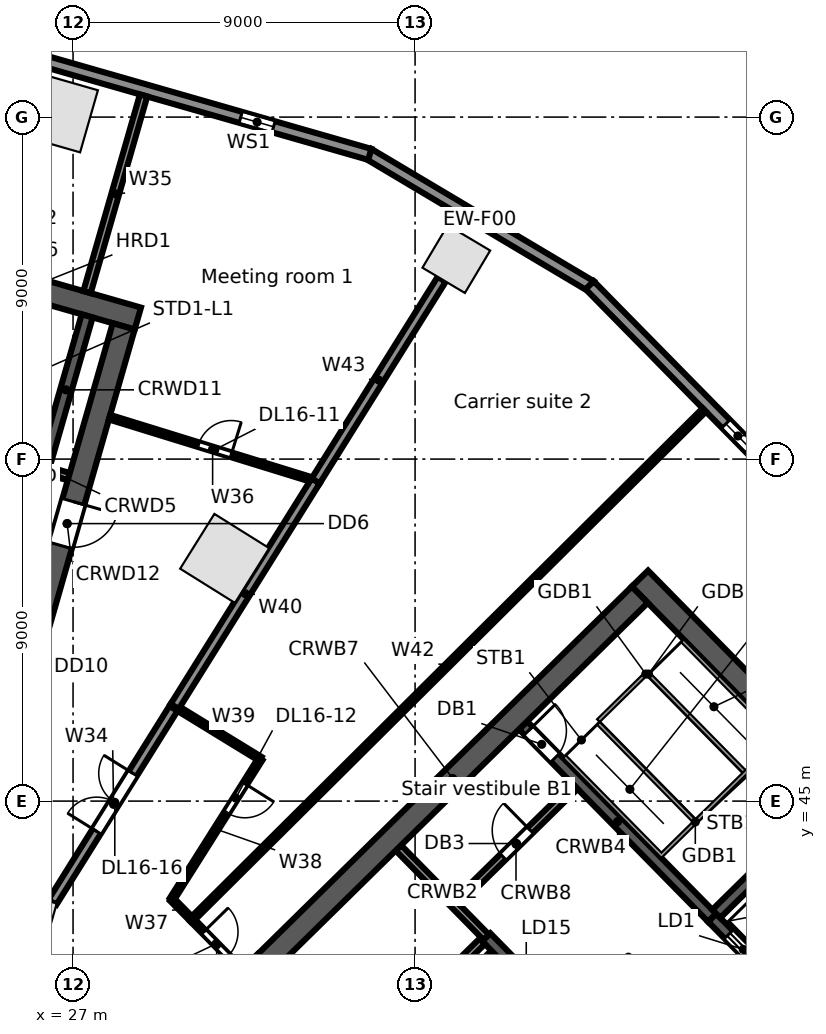
"""IFC4 building model, lengths in metres.
Left out: names, types, materials, properties, quantities, classifications, styles, units other than length and angle.
Written with IfcOpenShell. Run it as: python <this file> out.ifc"""

import sys

from ifc_helpers import new_model, si_unit, direction, frame, frame_2d, origin, origin_2d, place, context, subcontext, project, spatial, rectangle, extrude, element, fill, save


model = new_model("IFC4")
c1 = context("Model", 3, precision=1e-05, world=origin(), true_north=direction((0.0, 1.0)))
c2 = subcontext(c1, "Body", "Model", "MODEL_VIEW")
j1 = project(units=[si_unit("LENGTHUNIT", "METRE"), si_unit("PLANEANGLEUNIT", "RADIAN")], contexts=[c1])
p1 = place(None, origin())
s1 = spatial("IfcSite", under=j1, at=p1, CompositionType="ELEMENT")
p2 = place(p1, origin())
s2 = spatial("IfcBuilding", under=s1, at=p2, CompositionType="ELEMENT")
p3 = place(p2, frame((0.0, 0.0, 81.5)))
s3 = spatial("IfcBuildingStorey", under=s2, at=p3, CompositionType="ELEMENT", Elevation=81.5)
p4 = place(p3, frame((37.085, 59.262, 0.0), z_axis=(0.0, 0.0, 1.0), x_axis=(-0.859406411501, 0.511293086077, 0.0)))
e1 = element("IfcColumn", 1, at=p4, inside=s3, PredefinedType="COLUMN", context=c2, shape_type="SweptSolid", body=[
    extrude(rectangle(XDim=1.3, YDim=1.3, at=origin_2d()), origin(), (0.0, 0.0, 1.0), 5.0),
])
p5 = place(p3, frame((26.603, 63.124, 0.0), z_axis=(0.0, 0.0, 1.0), x_axis=(-0.961261695938, 0.275637355817, 0.0)))
e2 = element("IfcColumn", 2, at=p5, inside=s3, PredefinedType="COLUMN", context=c2, shape_type="SweptSolid", body=[
    extrude(rectangle(XDim=1.7, YDim=1.7, at=origin_2d()), origin(), (0.0, 0.0, 1.0), 5.0),
])
p6 = place(p3, frame((25.767, 41.86, 0.0), z_axis=(0.0, 0.0, 1.0), x_axis=(0.961261695938, -0.275637355817, 0.0)))
e3 = element("IfcColumn", 3, at=p6, inside=s3, PredefinedType="COLUMN", context=c2, shape_type="SweptSolid", body=[
    extrude(rectangle(XDim=1.3, YDim=1.3, at=origin_2d()), origin(), (0.0, 0.0, 1.0), 5.0),
])
p7 = place(p3, frame((30.99, 51.386, 0.0), z_axis=(0.0, 0.0, 1.0), x_axis=(0.529919264233, 0.848048096156, 0.0)))
e4 = element("IfcColumn", 4, at=p7, inside=s3, PredefinedType="COLUMN", context=c2, shape_type="SweptSolid", body=[
    extrude(rectangle(XDim=1.7, YDim=1.7, at=origin_2d()), origin(), (0.0, 0.0, 1.0), 5.0),
])
p8 = place(p3, frame((34.773, 62.034, 0.0), z_axis=(0.0, 0.0, 1.0), x_axis=(0.859401317772, -0.511301647769, 0.0)))
e5 = element("IfcWall", 5, at=p8, inside=s3, PredefinedType="STANDARD", context=c2, shape_type="SweptSolid", body=[
    extrude(rectangle(XDim=6.808, YDim=0.3, at=frame_2d((3.404, 0.0))), origin(), (0.0, 0.0, 1.0), 4.68),
])
p9 = place(p3, frame((3.335, 71.044, 0.0), z_axis=(0.0, 0.0, 1.0), x_axis=(0.961260130989, -0.275642813387, 0.0)))
e6 = element("IfcWall", 6, at=p9, inside=s3, PredefinedType="STANDARD", context=c2, shape_type="SweptSolid", body=[
    extrude(rectangle(XDim=32.741, YDim=0.3, at=frame_2d((16.371, 0.0))), origin(), (0.0, 0.0, 1.0), 4.68),
])
p10 = place(p9, frame((29.207, 0.0, 0.6)))
e7 = element("IfcOpeningElement", 7, at=p10, cuts=e6, PredefinedType="OPENING", context=c2, shape_type="SweptSolid", body=[
    extrude(rectangle(XDim=0.9, YDim=3.2, at=frame_2d((0.45, 1.6))), frame((0.0, 0.16, 0.0), z_axis=(0.0, -1.0, 0.0), x_axis=(1.0, 0.0, 0.0)), (0.0, 0.0, 1.0), 0.32),
])
p11 = place(p9, frame((21.034, 0.0, 0.6)))
e8 = element("IfcOpeningElement", 8, at=p11, cuts=e6, PredefinedType="OPENING", context=c2, shape_type="SweptSolid", body=[
    extrude(rectangle(XDim=0.9, YDim=3.2, at=frame_2d((0.45, 1.6))), frame((0.0, 0.16, 0.0), z_axis=(0.0, -1.0, 0.0), x_axis=(1.0, 0.0, 0.0)), (0.0, 0.0, 1.0), 0.32),
])
p12 = place(p9, frame((12.861, 0.0, 0.6)))
e9 = element("IfcOpeningElement", 9, at=p12, cuts=e6, PredefinedType="OPENING", context=c2, shape_type="SweptSolid", body=[
    extrude(rectangle(XDim=0.9, YDim=3.2, at=frame_2d((0.45, 1.6))), frame((0.0, 0.16, 0.0), z_axis=(0.0, -1.0, 0.0), x_axis=(1.0, 0.0, 0.0)), (0.0, 0.0, 1.0), 0.32),
])
p13 = place(p9, frame((4.688, 0.0, 0.6)))
e10 = element("IfcOpeningElement", 10, at=p13, cuts=e6, PredefinedType="OPENING", context=c2, shape_type="SweptSolid", body=[
    extrude(rectangle(XDim=0.9, YDim=3.2, at=frame_2d((0.45, 1.6))), frame((0.0, 0.16, 0.0), z_axis=(0.0, -1.0, 0.0), x_axis=(1.0, 0.0, 0.0)), (0.0, 0.0, 1.0), 0.32),
])
p14 = place(p3, frame((40.594, 58.577, 0.0), z_axis=(0.0, 0.0, 1.0), x_axis=(0.700909719808, -0.713250001528, 0.0)))
e11 = element("IfcWall", 11, at=p14, inside=s3, PredefinedType="STANDARD", context=c2, shape_type="SweptSolid", body=[
    extrude(rectangle(XDim=26.708, YDim=0.3, at=frame_2d((13.354, 0.0))), origin(), (0.0, 0.0, 1.0), 4.68),
])
p15 = place(p14, frame((22.858, 0.0, 0.6)))
e12 = element("IfcOpeningElement", 12, at=p15, cuts=e11, PredefinedType="OPENING", context=c2, shape_type="SweptSolid", body=[
    extrude(rectangle(XDim=0.9, YDim=3.2, at=frame_2d((0.45, 1.6))), frame((0.0, 0.16, 0.0), z_axis=(0.0, -1.0, 0.0), x_axis=(1.0, 0.0, 0.0)), (0.0, 0.0, 1.0), 0.32),
])
p16 = place(p14, frame((13.987, 0.0, 0.6)))
e13 = element("IfcOpeningElement", 13, at=p16, cuts=e11, PredefinedType="OPENING", context=c2, shape_type="SweptSolid", body=[
    extrude(rectangle(XDim=0.9, YDim=3.2, at=frame_2d((0.45, 1.6))), frame((0.0, 0.16, 0.0), z_axis=(0.0, -1.0, 0.0), x_axis=(1.0, 0.0, 0.0)), (0.0, 0.0, 1.0), 0.32),
])
p17 = place(p14, frame((5.115, 0.0, 0.6)))
e14 = element("IfcOpeningElement", 14, at=p17, cuts=e11, PredefinedType="OPENING", context=c2, shape_type="SweptSolid", body=[
    extrude(rectangle(XDim=0.9, YDim=3.2, at=frame_2d((0.45, 1.6))), frame((0.0, 0.16, 0.0), z_axis=(0.0, -1.0, 0.0), x_axis=(1.0, 0.0, 0.0)), (0.0, 0.0, 1.0), 0.32),
])
p18 = place(p3, frame((31.646, 40.763, 0.0), z_axis=(0.0, 0.0, 1.0), x_axis=(0.700911255944, -0.713248491965, 0.0)))
e15 = element("IfcWall", 15, at=p18, inside=s3, PredefinedType="SOLIDWALL", context=c2, shape_type="SweptSolid", body=[
    extrude(rectangle(XDim=15.0, YDim=0.6, at=frame_2d((7.5, 0.0))), origin(), (0.0, 0.0, 1.0), 4.68),
])
p19 = place(p18, frame((12.9, 0.0, 0.0)))
e16 = element("IfcOpeningElement", 16, at=p19, cuts=e15, PredefinedType="OPENING", context=c2, shape_type="SweptSolid", body=[
    extrude(rectangle(XDim=1.2, YDim=2.1, at=frame_2d((0.6, 1.05))), frame((0.0, 0.31, 0.0), z_axis=(0.0, -1.0, 0.0), x_axis=(1.0, 0.0, 0.0)), (0.0, 0.0, 1.0), 0.62),
])
p20 = place(p3, frame((35.561, 43.769, 0.0), z_axis=(0.0, 0.0, 1.0), x_axis=(0.70090232736, -0.713257266, 0.0)))
e17 = element("IfcWall", 17, at=p20, inside=s3, PredefinedType="SOLIDWALL", context=c2, shape_type="SweptSolid", body=[
    extrude(rectangle(XDim=3.3, YDim=0.2, at=frame_2d((1.65, 0.0))), origin(), (0.0, 0.0, 1.0), 4.68),
])
p21 = place(p3, frame((37.874, 41.416, 0.0), z_axis=(0.0, 0.0, 1.0), x_axis=(0.700918271237, -0.71324159795, 0.0)))
e18 = element("IfcWall", 18, at=p21, inside=s3, PredefinedType="SOLIDWALL", context=c2, shape_type="SweptSolid", body=[
    extrude(rectangle(XDim=8.4, YDim=0.3, at=frame_2d((4.2, 0.0))), origin(), (0.0, 0.0, 1.0), 4.68),
])
p22 = place(p21, frame((0.95, 0.0, 0.0)))
e19 = element("IfcOpeningElement", 19, at=p22, cuts=e18, PredefinedType="OPENING", context=c2, shape_type="SweptSolid", body=[
    extrude(rectangle(XDim=1.1, YDim=2.1, at=frame_2d((0.55, 1.05))), frame((0.0, 0.16, 0.0), z_axis=(0.0, -1.0, 0.0), x_axis=(1.0, 0.0, 0.0)), (0.0, 0.0, 1.0), 0.32),
])
p23 = place(p21, frame((3.95, 0.0, 0.0)))
e20 = element("IfcOpeningElement", 20, at=p23, cuts=e18, PredefinedType="OPENING", context=c2, shape_type="SweptSolid", body=[
    extrude(rectangle(XDim=1.1, YDim=2.1, at=frame_2d((0.55, 1.05))), frame((0.0, 0.16, 0.0), z_axis=(0.0, -1.0, 0.0), x_axis=(1.0, 0.0, 0.0)), (0.0, 0.0, 1.0), 0.32),
])
p24 = place(p21, frame((6.65, 0.0, 0.0)))
e21 = element("IfcOpeningElement", 21, at=p24, cuts=e18, PredefinedType="OPENING", context=c2, shape_type="SweptSolid", body=[
    extrude(rectangle(XDim=1.1, YDim=2.1, at=frame_2d((0.55, 1.05))), frame((0.0, 0.16, 0.0), z_axis=(0.0, -1.0, 0.0), x_axis=(1.0, 0.0, 0.0)), (0.0, 0.0, 1.0), 0.32),
])
p25 = place(p3, frame((38.842, 46.993, 0.0), z_axis=(0.0, 0.0, 1.0), x_axis=(0.700907701701, -0.713251984713, 0.0)))
e22 = element("IfcWall", 22, at=p25, inside=s3, PredefinedType="SOLIDWALL", context=c2, shape_type="SweptSolid", body=[
    extrude(rectangle(XDim=7.1, YDim=0.3, at=frame_2d((3.55, 0.0))), origin(), (0.0, 0.0, 1.0), 4.68),
])
p26 = place(p25, frame((0.2, 0.0, 0.0)))
e23 = element("IfcOpeningElement", 23, at=p26, cuts=e22, PredefinedType="OPENING", context=c2, shape_type="SweptSolid", body=[
    extrude(rectangle(XDim=1.0, YDim=2.1, at=frame_2d((0.5, 1.05))), frame((0.0, 0.16, 0.0), z_axis=(0.0, -1.0, 0.0), x_axis=(1.0, 0.0, 0.0)), (0.0, 0.0, 1.0), 0.32),
])
p27 = place(p3, frame((43.819, 41.929, 0.0), z_axis=(0.0, 0.0, 1.0), x_axis=(0.700921619155, -0.713238307862, 0.0)))
e24 = element("IfcWall", 24, at=p27, inside=s3, PredefinedType="SOLIDWALL", context=c2, shape_type="SweptSolid", body=[
    extrude(rectangle(XDim=6.7, YDim=0.3, at=frame_2d((3.35, 0.0))), origin(), (0.0, 0.0, 1.0), 4.68),
])
p28 = place(p27, frame((0.615, 0.0, 0.0)))
e25 = element("IfcOpeningElement", 25, at=p28, cuts=e24, PredefinedType="OPENING", context=c2, shape_type="SweptSolid", body=[
    extrude(rectangle(XDim=1.1, YDim=2.1, at=frame_2d((0.55, 1.05))), frame((0.0, 0.16, 0.0), z_axis=(0.0, -1.0, 0.0), x_axis=(1.0, 0.0, 0.0)), (0.0, 0.0, 1.0), 0.32),
])
p29 = place(p27, frame((2.945, 0.0, 0.0)))
e26 = element("IfcOpeningElement", 26, at=p29, cuts=e24, PredefinedType="OPENING", context=c2, shape_type="SweptSolid", body=[
    extrude(rectangle(XDim=1.1, YDim=2.1, at=frame_2d((0.55, 1.05))), frame((0.0, 0.16, 0.0), z_axis=(0.0, -1.0, 0.0), x_axis=(1.0, 0.0, 0.0)), (0.0, 0.0, 1.0), 0.32),
])
p30 = place(p27, frame((5.28, 0.0, 0.0)))
e27 = element("IfcOpeningElement", 27, at=p30, cuts=e24, PredefinedType="OPENING", context=c2, shape_type="SweptSolid", body=[
    extrude(rectangle(XDim=1.1, YDim=2.1, at=frame_2d((0.55, 1.05))), frame((0.0, 0.16, 0.0), z_axis=(0.0, -1.0, 0.0), x_axis=(1.0, 0.0, 0.0)), (0.0, 0.0, 1.0), 0.32),
])
p31 = place(p3, frame((41.917, 50.856, 0.0), z_axis=(0.0, 0.0, 1.0), x_axis=(0.700911255944, -0.713248491965, 0.0)))
e28 = element("IfcWall", 28, at=p31, inside=s3, PredefinedType="SOLIDWALL", context=c2, shape_type="SweptSolid", body=[
    extrude(rectangle(XDim=15.0, YDim=0.6, at=frame_2d((7.5, 0.0))), origin(), (0.0, 0.0, 1.0), 4.68),
])
p32 = place(p3, frame((32.07, 40.759, 0.0), z_axis=(0.0, 0.0, 1.0), x_axis=(0.713245344712, 0.70091445858, 0.0)))
e29 = element("IfcWall", 29, at=p32, inside=s3, PredefinedType="SOLIDWALL", context=c2, shape_type="SweptSolid", body=[
    extrude(rectangle(XDim=13.8, YDim=0.6, at=frame_2d((6.9, 0.0))), origin(), (0.0, 0.0, 1.0), 4.68),
])
p33 = place(p3, frame((37.104, 42.342, 0.0), z_axis=(0.0, 0.0, 1.0), x_axis=(0.713281298468, 0.700877870428, 0.0)))
e30 = element("IfcWall", 30, at=p33, inside=s3, PredefinedType="PARTITIONING", context=c2, shape_type="SweptSolid", body=[
    extrude(rectangle(XDim=4.35, YDim=0.2, at=frame_2d((2.175, 0.0))), origin(), (0.0, 0.0, 1.0), 4.68),
])
p34 = place(p33, frame((1.7, 0.0, 0.0)))
e31 = element("IfcOpeningElement", 31, at=p34, cuts=e30, PredefinedType="OPENING", context=c2, shape_type="SweptSolid", body=[
    extrude(rectangle(XDim=1.0, YDim=2.1, at=frame_2d((0.5, 1.05))), frame((0.0, 0.11, 0.0), z_axis=(0.0, -1.0, 0.0), x_axis=(1.0, 0.0, 0.0)), (0.0, 0.0, 1.0), 0.22),
])
p35 = place(p3, frame((34.593, 38.191, 0.0), z_axis=(0.0, 0.0, 1.0), x_axis=(0.713252216116, 0.700907466222, 0.0)))
e32 = element("IfcWall", 32, at=p35, inside=s3, PredefinedType="SOLIDWALL", context=c2, shape_type="SweptSolid", body=[
    extrude(rectangle(XDim=4.45, YDim=0.2, at=frame_2d((2.225, 0.0))), origin(), (0.0, 0.0, 1.0), 4.68),
])
p36 = place(p3, frame((43.926, 42.034, 0.0), z_axis=(0.0, 0.0, 1.0), x_axis=(0.713251741427, 0.700907949271, 0.0)))
e33 = element("IfcWall", 33, at=p36, inside=s3, PredefinedType="SOLIDWALL", context=c2, shape_type="SweptSolid", body=[
    extrude(rectangle(XDim=4.45, YDim=0.3, at=frame_2d((2.225, 0.0))), origin(), (0.0, 0.0, 1.0), 4.68),
])
p37 = place(p3, frame((26.214, 53.732, 0.0), z_axis=(0.0, 0.0, 1.0), x_axis=(0.96122076476, -0.27578005982, 0.0)))
e34 = element("IfcWall", 34, at=p37, inside=s3, PredefinedType="SOLIDWALL", context=c2, shape_type="SweptSolid", body=[
    extrude(rectangle(XDim=0.7, YDim=0.2, at=frame_2d((0.35, 0.0))), origin(), (0.0, 0.0, 1.0), 4.68),
])
p38 = place(p3, frame((20.053, 60.18, 0.0), z_axis=(0.0, 0.0, 1.0), x_axis=(0.96126248289, -0.275634611374, 0.0)))
e35 = element("IfcWall", 35, at=p38, inside=s3, PredefinedType="SOLIDWALL", context=c2, shape_type="SweptSolid", body=[
    extrude(rectangle(XDim=9.0, YDim=0.6, at=frame_2d((4.5, 0.0))), origin(), (0.0, 0.0, 1.0), 4.68),
])
p39 = place(p3, frame((26.256, 53.876, 0.0), z_axis=(0.0, 0.0, 1.0), x_axis=(0.275612739511, 0.961268754209, 0.0)))
e36 = element("IfcWall", 36, at=p39, inside=s3, PredefinedType="SOLIDWALL", context=c2, shape_type="SweptSolid", body=[
    extrude(rectangle(XDim=4.05, YDim=0.3, at=frame_2d((2.025, 0.0))), origin(), (0.0, 0.0, 1.0), 4.68),
])
p40 = place(p3, frame((25.356, 47.112, 0.0), z_axis=(0.0, 0.0, 1.0), x_axis=(0.275631631629, 0.961263337304, 0.0)))
e37 = element("IfcWall", 37, at=p40, inside=s3, PredefinedType="SOLIDWALL", context=c2, shape_type="SweptSolid", body=[
    extrude(rectangle(XDim=10.8, YDim=0.6, at=frame_2d((5.4, 0.0))), origin(), (0.0, 0.0, 1.0), 4.68),
])
p41 = place(p40, frame((4.8, 0.0, 0.0)))
e38 = element("IfcOpeningElement", 38, at=p41, cuts=e37, PredefinedType="OPENING", context=c2, shape_type="SweptSolid", body=[
    extrude(rectangle(XDim=1.2, YDim=2.1, at=frame_2d((0.6, 1.05))), frame((0.0, 0.31, 0.0), z_axis=(0.0, -1.0, 0.0), x_axis=(1.0, 0.0, 0.0)), (0.0, 0.0, 1.0), 0.62),
])
p42 = place(p3, frame((26.456, 42.338, 0.0), z_axis=(0.0, 0.0, 1.0), x_axis=(0.52980027265, 0.848122438743, 0.0)))
e39 = element("IfcWall", 39, at=p42, inside=s3, PredefinedType="PARTITIONING", context=c2, shape_type="SweptSolid", body=[
    extrude(rectangle(XDim=6.076, YDim=0.25, at=frame_2d((3.038, 0.0))), origin(), (0.0, 0.0, 1.0), 4.68),
])
p43 = place(p42, frame((2.2, 0.0, 0.0)))
e40 = element("IfcOpeningElement", 40, at=p43, cuts=e39, PredefinedType="OPENING", context=c2, shape_type="SweptSolid", body=[
    extrude(rectangle(XDim=1.8, YDim=2.1, at=frame_2d((0.9, 1.05))), frame((0.0, 0.135, 0.0), z_axis=(0.0, -1.0, 0.0), x_axis=(1.0, 0.0, 0.0)), (0.0, 0.0, 1.0), 0.27),
])
p44 = place(p3, frame((27.368, 58.394, 0.0), z_axis=(0.0, 0.0, 1.0), x_axis=(0.276295387056, 0.961072764722, 0.0)))
e41 = element("IfcWall", 41, at=p44, inside=s3, PredefinedType="PARTITIONING", context=c2, shape_type="SweptSolid", body=[
    extrude(rectangle(XDim=5.386, YDim=0.2, at=frame_2d((2.693, 0.0))), origin(), (0.0, 0.0, 1.0), 3.748),
])
p45 = place(p3, frame((27.96, 55.103, 0.0), z_axis=(0.0, 0.0, 1.0), x_axis=(0.955442775069, -0.29517639399, 0.0)))
e42 = element("IfcWall", 42, at=p45, inside=s3, PredefinedType="PARTITIONING", context=c2, shape_type="SweptSolid", body=[
    extrude(rectangle(XDim=5.678, YDim=0.125, at=frame_2d((2.839, 0.0))), origin(), (0.0, 0.0, 1.0), 3.748),
])
p46 = place(p45, frame((2.45, 0.0, 0.0)))
e43 = element("IfcOpeningElement", 43, at=p46, cuts=e42, PredefinedType="OPENING", context=c2, shape_type="SweptSolid", body=[
    extrude(rectangle(XDim=0.9, YDim=2.1, at=frame_2d((0.45, 1.05))), frame((0.0, 0.073, 0.0), z_axis=(0.0, -1.0, 0.0), x_axis=(1.0, 0.0, 0.0)), (0.0, 0.0, 1.0), 0.145),
])
p47 = place(p3, frame((29.6, 42.416, 0.0), z_axis=(0.0, 0.0, 1.0), x_axis=(0.701711125926, -0.71246157493, 0.0)))
e44 = element("IfcWall", 44, at=p47, inside=s3, PredefinedType="PARTITIONING", context=c2, shape_type="SweptSolid", body=[
    extrude(rectangle(XDim=0.75, YDim=0.125, at=frame_2d((0.375, 0.0))), origin(), (0.0, 0.0, 1.0), 4.68),
])
p48 = place(p3, frame((29.6, 42.416, 0.0), z_axis=(0.0, 0.0, 1.0), x_axis=(0.533582711531, 0.84574788794, 0.0)))
e45 = element("IfcWall", 45, at=p48, inside=s3, PredefinedType="PARTITIONING", context=c2, shape_type="SweptSolid", body=[
    extrude(rectangle(XDim=4.366, YDim=0.125, at=frame_2d((2.183, 0.0))), origin(), (0.0, 0.0, 1.0), 4.68),
])
p49 = place(p48, frame((2.7, 0.0, 0.0)))
e46 = element("IfcOpeningElement", 46, at=p49, cuts=e45, PredefinedType="OPENING", context=c2, shape_type="SweptSolid", body=[
    extrude(rectangle(XDim=0.9, YDim=2.1, at=frame_2d((0.45, 1.05))), frame((0.0, 0.073, 0.0), z_axis=(0.0, -1.0, 0.0), x_axis=(1.0, 0.0, 0.0)), (0.0, 0.0, 1.0), 0.145),
])
p50 = place(p3, frame((29.675, 47.491, 0.0), z_axis=(0.0, 0.0, 1.0), x_axis=(0.852591965232, -0.522577210392, 0.0)))
e47 = element("IfcWall", 47, at=p50, inside=s3, PredefinedType="PARTITIONING", context=c2, shape_type="SweptSolid", body=[
    extrude(rectangle(XDim=2.645, YDim=0.125, at=frame_2d((1.322, 0.0))), origin(), (0.0, 0.0, 1.0), 4.68),
])
p51 = place(p3, frame((29.675, 47.491, 0.0), z_axis=(0.0, 0.0, 1.0), x_axis=(0.529992669945, 0.848002222759, 0.0)))
e48 = element("IfcWall", 48, at=p51, inside=s3, PredefinedType="PARTITIONING", context=c2, shape_type="SweptSolid", body=[
    extrude(rectangle(XDim=7.0, YDim=0.25, at=frame_2d((3.5, 0.0))), origin(), (0.0, 0.0, 1.0), 3.742),
])
p52 = place(p3, frame((30.126, 41.882, 0.0), z_axis=(0.0, 0.0, 1.0), x_axis=(0.700593717615, -0.713560398872, 0.0)))
e49 = element("IfcWall", 49, at=p52, inside=s3, PredefinedType="PARTITIONING", context=c2, shape_type="SweptSolid", body=[
    extrude(rectangle(XDim=1.864, YDim=0.125, at=frame_2d((0.932, 0.0))), origin(), (0.0, 0.0, 1.0), 4.68),
])
p53 = place(p52, frame((0.45, 0.0, 0.0)))
e50 = element("IfcOpeningElement", 50, at=p53, cuts=e49, PredefinedType="OPENING", context=c2, shape_type="SweptSolid", body=[
    extrude(rectangle(XDim=0.9, YDim=2.1, at=frame_2d((0.45, 1.05))), frame((0.0, 0.073, 0.0), z_axis=(0.0, -1.0, 0.0), x_axis=(1.0, 0.0, 0.0)), (0.0, 0.0, 1.0), 0.145),
])
p54 = place(p3, frame((30.126, 41.882, 0.0), z_axis=(0.0, 0.0, 1.0), x_axis=(0.709029789155, 0.705178529233, 0.0)))
e51 = element("IfcWall", 51, at=p54, inside=s3, PredefinedType="PARTITIONING", context=c2, shape_type="SweptSolid", body=[
    extrude(rectangle(XDim=19.018, YDim=0.125, at=frame_2d((9.509, 0.0))), origin(), (0.0, 0.0, 1.0), 3.742),
])
p55 = place(p3, frame((33.385, 53.427, 0.0), z_axis=(0.0, 0.0, 1.0), x_axis=(0.529897235032, 0.848061861131, 0.0)))
e52 = element("IfcWall", 52, at=p55, inside=s3, PredefinedType="PARTITIONING", context=c2, shape_type="SweptSolid", body=[
    extrude(rectangle(XDim=6.258, YDim=0.25, at=frame_2d((3.129, 0.0))), origin(), (0.0, 0.0, 1.0), 3.742),
])
p56 = place(p10, origin())
e53 = element("IfcWindow", 53, at=p56, inside=s3, PartitioningType="SINGLE_PANEL", PredefinedType="WINDOW", context=c2, shape_type="SweptSolid", body=[
    extrude(rectangle(XDim=0.9, YDim=3.2, at=frame_2d((0.45, 1.6))), frame((0.0, 0.03, 0.0), z_axis=(0.0, -1.0, 0.0), x_axis=(1.0, 0.0, 0.0)), (0.0, 0.0, 1.0), 0.06),
])
fill(e7, e53)
p57 = place(p17, origin())
e54 = element("IfcWindow", 54, at=p57, inside=s3, PartitioningType="SINGLE_PANEL", PredefinedType="WINDOW", context=c2, shape_type="SweptSolid", body=[
    extrude(rectangle(XDim=0.9, YDim=3.2, at=frame_2d((0.45, 1.6))), frame((0.0, 0.03, 0.0), z_axis=(0.0, -1.0, 0.0), x_axis=(1.0, 0.0, 0.0)), (0.0, 0.0, 1.0), 0.06),
])
fill(e14, e54)
p58 = place(p28, origin())
e55 = element("IfcDoor", 55, at=p58, inside=s3, OperationType="DOUBLE_DOOR_SLIDING", PredefinedType="DOOR", context=c2, shape_type="SweptSolid", body=[
    extrude(rectangle(XDim=1.1, YDim=2.1, at=frame_2d((0.55, 1.05))), frame((0.0, 0.025, 0.0), z_axis=(0.0, -1.0, 0.0), x_axis=(1.0, 0.0, 0.0)), (0.0, 0.0, 1.0), 0.05),
])
fill(e25, e55)
p59 = place(p26, origin())
e56 = element("IfcDoor", 56, at=p59, inside=s3, OperationType="SINGLE_SWING_LEFT", PredefinedType="DOOR", context=c2, shape_type="SweptSolid", body=[
    extrude(rectangle(XDim=1.0, YDim=2.1, at=frame_2d((0.5, 1.05))), frame((0.0, 0.025, 0.0), z_axis=(0.0, -1.0, 0.0), x_axis=(1.0, 0.0, 0.0)), (0.0, 0.0, 1.0), 0.05),
])
fill(e23, e56)
p60 = place(p34, origin())
e57 = element("IfcDoor", 57, at=p60, inside=s3, OperationType="SINGLE_SWING_RIGHT", PredefinedType="DOOR", context=c2, shape_type="SweptSolid", body=[
    extrude(rectangle(XDim=1.0, YDim=2.1, at=frame_2d((0.5, 1.05))), frame((0.0, 0.025, 0.0), z_axis=(0.0, -1.0, 0.0), x_axis=(1.0, 0.0, 0.0)), (0.0, 0.0, 1.0), 0.05),
])
fill(e31, e57)
p61 = place(p41, frame((1.2, 0.0, 0.0), z_axis=(0.0, 0.0, 1.0), x_axis=(-1.0, 0.0, 0.0)))
e58 = element("IfcDoor", 58, at=p61, inside=s3, OperationType="SINGLE_SWING_LEFT", PredefinedType="DOOR", context=c2, shape_type="SweptSolid", body=[
    extrude(rectangle(XDim=1.2, YDim=2.1, at=frame_2d((0.6, 1.05))), frame((0.0, 0.025, 0.0), z_axis=(0.0, -1.0, 0.0), x_axis=(1.0, 0.0, 0.0)), (0.0, 0.0, 1.0), 0.05),
])
fill(e38, e58)
p62 = place(p46, origin())
e59 = element("IfcDoor", 59, at=p62, inside=s3, OperationType="SINGLE_SWING_RIGHT", PredefinedType="DOOR", context=c2, shape_type="SweptSolid", body=[
    extrude(rectangle(XDim=0.9, YDim=2.1, at=frame_2d((0.45, 1.05))), frame((0.0, 0.025, 0.0), z_axis=(0.0, -1.0, 0.0), x_axis=(1.0, 0.0, 0.0)), (0.0, 0.0, 1.0), 0.05),
])
fill(e43, e59)
p63 = place(p49, frame((0.9, 0.0, 0.0), z_axis=(0.0, 0.0, 1.0), x_axis=(-1.0, 0.0, 0.0)))
e60 = element("IfcDoor", 60, at=p63, inside=s3, OperationType="SINGLE_SWING_LEFT", PredefinedType="DOOR", context=c2, shape_type="SweptSolid", body=[
    extrude(rectangle(XDim=0.9, YDim=2.1, at=frame_2d((0.45, 1.05))), frame((0.0, 0.025, 0.0), z_axis=(0.0, -1.0, 0.0), x_axis=(1.0, 0.0, 0.0)), (0.0, 0.0, 1.0), 0.05),
])
fill(e46, e60)
p64 = place(p53, origin())
e61 = element("IfcDoor", 61, at=p64, inside=s3, OperationType="SINGLE_SWING_LEFT", PredefinedType="DOOR", context=c2, shape_type="SweptSolid", body=[
    extrude(rectangle(XDim=0.9, YDim=2.1, at=frame_2d((0.45, 1.05))), frame((0.0, 0.025, 0.0), z_axis=(0.0, -1.0, 0.0), x_axis=(1.0, 0.0, 0.0)), (0.0, 0.0, 1.0), 0.05),
])
fill(e50, e61)
p65 = place(p43, origin())
e62 = element("IfcDoor", 62, at=p65, inside=s3, OperationType="DOUBLE_DOOR_SINGLE_SWING", PredefinedType="DOOR", context=c2, shape_type="SweptSolid", body=[
    extrude(rectangle(XDim=1.8, YDim=2.1, at=frame_2d((0.9, 1.05))), frame((0.0, 0.025, 0.0), z_axis=(0.0, -1.0, 0.0), x_axis=(1.0, 0.0, 0.0)), (0.0, 0.0, 1.0), 0.05),
])
fill(e40, e62)
save(model, sys.argv[1])
